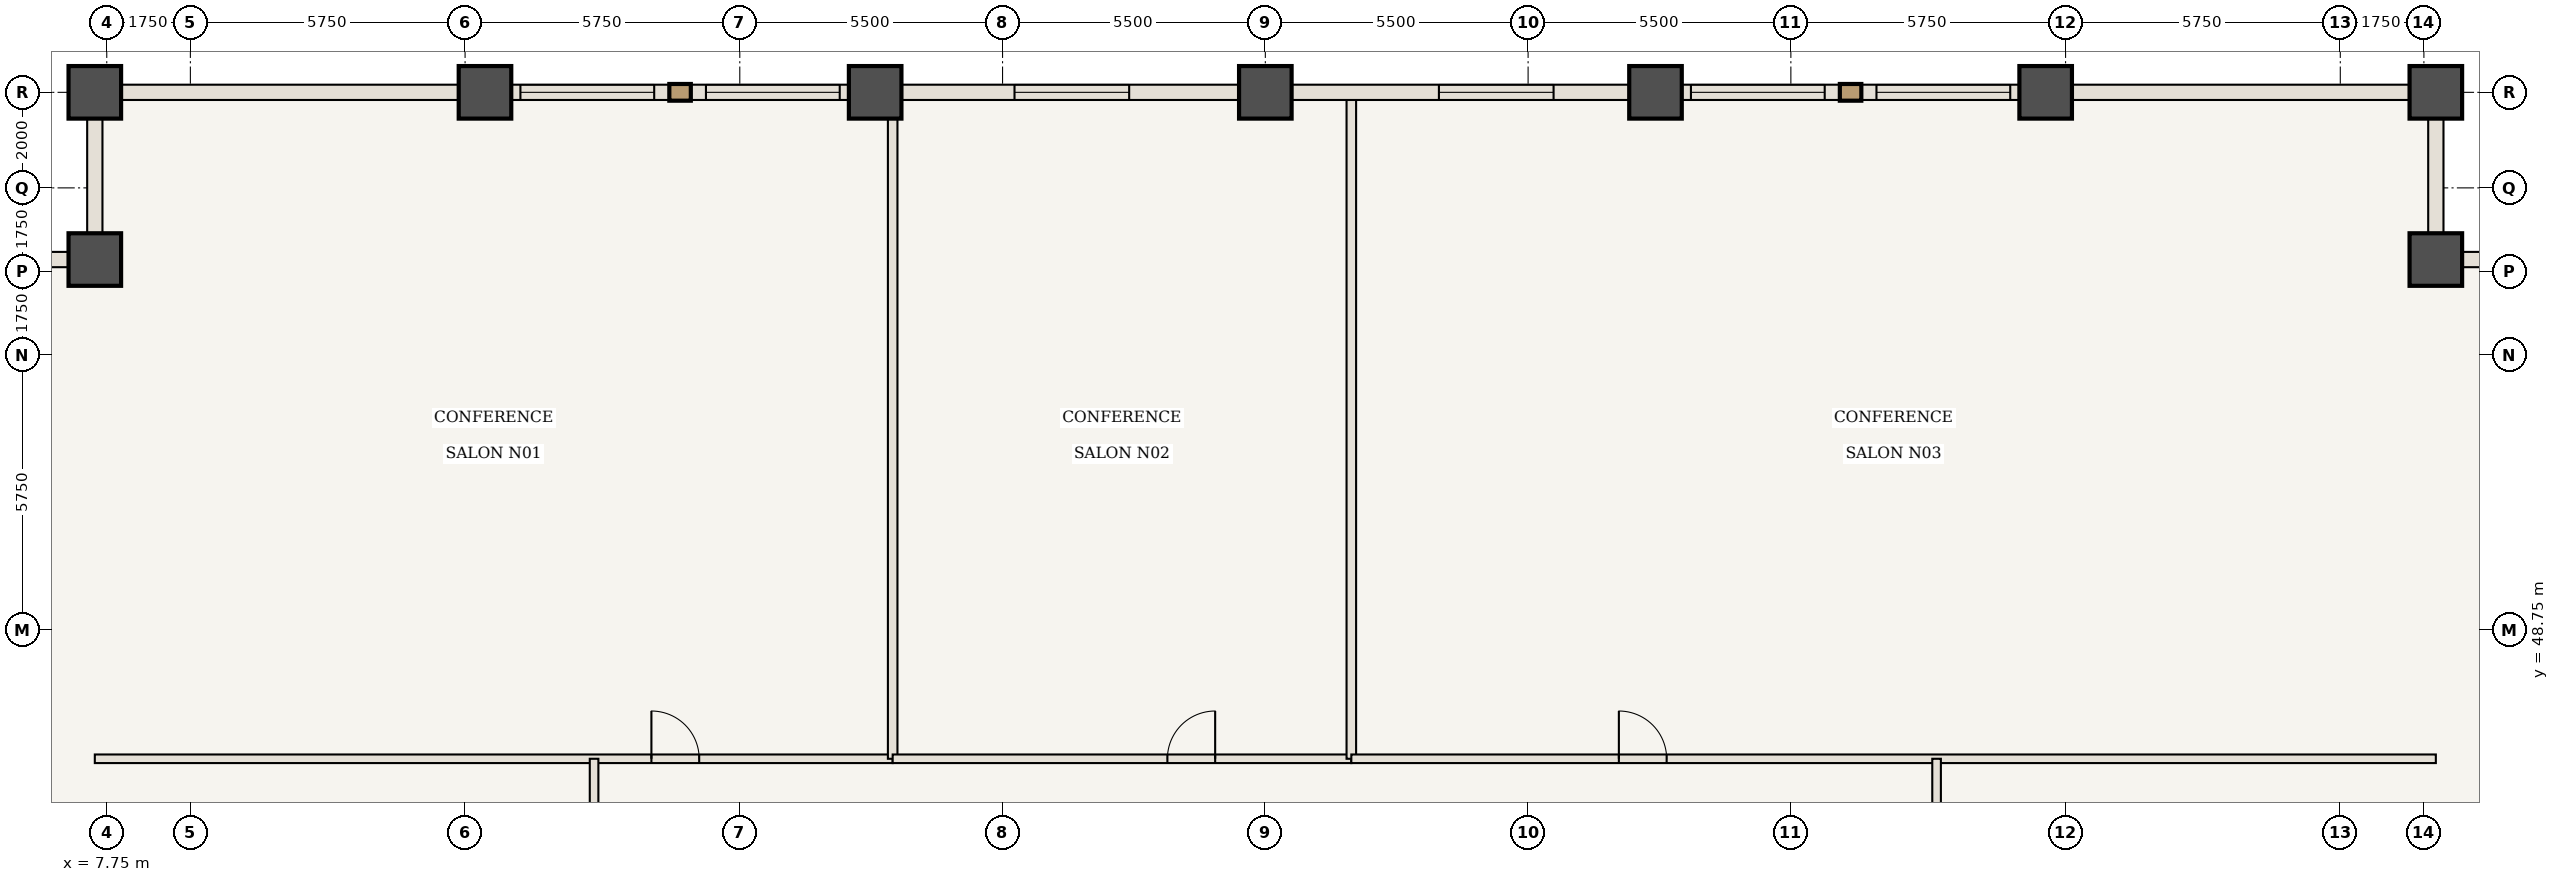
"""IFC4 building model, lengths in metres.
Left out: names, types, materials, properties, quantities, classifications, styles, units other than length and angle.
Written with IfcOpenShell. Run it as: python <this file> out.ifc"""

import sys

from ifc_helpers import new_model, si_unit, direction, frame, frame_2d, origin, origin_2d, place, context, subcontext, project, spatial, rectangle, extrude, element, fill, save


model = new_model("IFC4")
c1 = context("Model", 3, precision=1e-05, world=origin(), true_north=direction((0.0, 1.0)))
c2 = subcontext(c1, "Body", "Model", "MODEL_VIEW")
j1 = project(units=[si_unit("LENGTHUNIT", "METRE"), si_unit("PLANEANGLEUNIT", "RADIAN")], contexts=[c1])
p1 = place(None, origin())
s1 = spatial("IfcSite", under=j1, at=p1, CompositionType="ELEMENT")
p2 = place(p1, origin())
s2 = spatial("IfcBuilding", under=s1, at=p2, CompositionType="ELEMENT")
p3 = place(p2, frame((0.0, 0.0, 70.35)))
s3 = spatial("IfcBuildingStorey", under=s2, at=p3, CompositionType="ELEMENT", Elevation=70.35)
for number, where, z_axis, x_axis in (
    (1, (56.5, 56.5, 0.0), (0.0, 0.0, 1.0), (1.0, 0.0, 0.0)),
    (2, (56.5, 60.0, 0.0), (0.0, 0.0, 1.0), (1.0, 0.0, 0.0)),
    (3, (7.5, 60.0, 0.0), (0.0, 0.0, 1.0), (1.0, 0.0, 0.0)),
    (4, (7.5, 56.5, 0.0), (0.0, 0.0, 1.0), (1.0, 0.0, 0.0)),
    (5, (15.667, 60.0, 0.0), (0.0, 0.0, 1.0), (1.0, 0.0, 0.0)),
    (6, (23.833, 60.0, 0.0), (0.0, 0.0, 1.0), (1.0, 0.0, 0.0)),
    (7, (32.0, 60.0, 0.0), (0.0, 0.0, 1.0), (1.0, 0.0, 0.0)),
    (8, (40.167, 60.0, 0.0), (0.0, 0.0, 1.0), (1.0, 0.0, 0.0)),
    (9, (48.333, 60.0, 0.0), (0.0, 0.0, 1.0), (1.0, 0.0, 0.0)),
):
    element("IfcColumn", number, at=place(p3, frame(where, z_axis=z_axis, x_axis=x_axis)), inside=s3, PredefinedType="COLUMN", context=c2, shape_type="SweptSolid", body=[
        extrude(rectangle(XDim=1.1, YDim=1.1, at=origin_2d()), origin(), (0.0, 0.0, 1.0), 3.5),
    ])
p4 = place(p3, frame((7.5, 46.05, 0.0), z_axis=(0.0, 0.0, 1.0), x_axis=(1.0, 0.0, 0.0)))
e10 = element("IfcWall", 10, at=p4, inside=s3, PredefinedType="STANDARD", context=c2, shape_type="SweptSolid", body=[
    extrude(rectangle(XDim=16.7, YDim=0.18, at=frame_2d((8.35, 0.0))), origin(), (0.0, 0.0, 1.0), 3.32),
])
p5 = place(p4, frame((11.65, 0.0, 0.0)))
e11 = element("IfcOpeningElement", 11, at=p5, cuts=e10, PredefinedType="OPENING", context=c2, shape_type="SweptSolid", body=[
    extrude(rectangle(XDim=1.0, YDim=2.15, at=frame_2d((0.5, 1.075))), frame((0.0, 0.1, 0.0), z_axis=(0.0, -1.0, 0.0), x_axis=(1.0, 0.0, 0.0)), (0.0, 0.0, 1.0), 0.2),
])
p6 = place(p3, frame((24.2, 46.05, 0.0), z_axis=(0.0, 0.0, 1.0), x_axis=(0.0, 1.0, 0.0)))
e12 = element("IfcWall", 12, at=p6, inside=s3, PredefinedType="STANDARD", context=c2, shape_type="SweptSolid", body=[
    extrude(rectangle(XDim=13.89, YDim=0.2, at=frame_2d((6.945, 0.0))), origin(), (0.0, 0.0, 1.0), 3.32),
])
p7 = place(p3, frame((24.2, 46.05, 0.0), z_axis=(0.0, 0.0, 1.0), x_axis=(1.0, 0.0, 0.0)))
e13 = element("IfcWall", 13, at=p7, inside=s3, PredefinedType="STANDARD", context=c2, shape_type="SweptSolid", body=[
    extrude(rectangle(XDim=9.6, YDim=0.18, at=frame_2d((4.8, 0.0))), origin(), (0.0, 0.0, 1.0), 3.32),
])
p8 = place(p7, frame((5.75, 0.0, 0.0)))
e14 = element("IfcOpeningElement", 14, at=p8, cuts=e13, PredefinedType="OPENING", context=c2, shape_type="SweptSolid", body=[
    extrude(rectangle(XDim=1.0, YDim=2.15, at=frame_2d((0.5, 1.075))), frame((0.0, 0.1, 0.0), z_axis=(0.0, -1.0, 0.0), x_axis=(1.0, 0.0, 0.0)), (0.0, 0.0, 1.0), 0.2),
])
p9 = place(p3, frame((33.8, 46.05, 0.0), z_axis=(0.0, 0.0, 1.0), x_axis=(0.0, 1.0, 0.0)))
e15 = element("IfcWall", 15, at=p9, inside=s3, PredefinedType="STANDARD", context=c2, shape_type="SweptSolid", body=[
    extrude(rectangle(XDim=13.89, YDim=0.2, at=frame_2d((6.945, 0.0))), origin(), (0.0, 0.0, 1.0), 3.32),
])
p10 = place(p3, frame((33.8, 46.05, 0.0), z_axis=(0.0, 0.0, 1.0), x_axis=(1.0, 0.0, 0.0)))
e16 = element("IfcWall", 16, at=p10, inside=s3, PredefinedType="STANDARD", context=c2, shape_type="SweptSolid", body=[
    extrude(rectangle(XDim=22.7, YDim=0.18, at=frame_2d((11.35, 0.0))), origin(), (0.0, 0.0, 1.0), 3.32),
])
p11 = place(p10, frame((5.6, 0.0, 0.0)))
e17 = element("IfcOpeningElement", 17, at=p11, cuts=e16, PredefinedType="OPENING", context=c2, shape_type="SweptSolid", body=[
    extrude(rectangle(XDim=1.0, YDim=2.15, at=frame_2d((0.5, 1.075))), frame((0.0, 0.1, 0.0), z_axis=(0.0, -1.0, 0.0), x_axis=(1.0, 0.0, 0.0)), (0.0, 0.0, 1.0), 0.2),
])
p12 = place(p3, frame((17.95, 33.5, 0.0), z_axis=(0.0, 0.0, 1.0), x_axis=(0.0, 1.0, 0.0)))
e18 = element("IfcWall", 18, at=p12, inside=s3, PredefinedType="STANDARD", context=c2, shape_type="SweptSolid", body=[
    extrude(rectangle(XDim=12.55, YDim=0.18, at=frame_2d((6.275, 0.0))), origin(), (0.0, 0.0, 1.0), 3.32),
])
p13 = place(p12, frame((5.775, 0.0, 0.0)))
e19 = element("IfcOpeningElement", 19, at=p13, cuts=e18, PredefinedType="OPENING", context=c2, shape_type="SweptSolid", body=[
    extrude(rectangle(XDim=1.0, YDim=2.15, at=frame_2d((0.5, 1.075))), frame((0.0, 0.1, 0.0), z_axis=(0.0, -1.0, 0.0), x_axis=(1.0, 0.0, 0.0)), (0.0, 0.0, 1.0), 0.2),
])
p14 = place(p3, frame((46.05, 41.9, 0.0), z_axis=(0.0, 0.0, 1.0), x_axis=(0.0, 1.0, 0.0)))
e20 = element("IfcWall", 20, at=p14, inside=s3, PredefinedType="STANDARD", context=c2, shape_type="SweptSolid", body=[
    extrude(rectangle(XDim=4.15, YDim=0.18, at=frame_2d((2.075, 0.0))), origin(), (0.0, 0.0, 1.0), 3.32),
])
p15 = place(p14, frame((1.575, 0.0, 0.0)))
e21 = element("IfcOpeningElement", 21, at=p15, cuts=e20, PredefinedType="OPENING", context=c2, shape_type="SweptSolid", body=[
    extrude(rectangle(XDim=1.0, YDim=2.15, at=frame_2d((0.5, 1.075))), frame((0.0, 0.1, 0.0), z_axis=(0.0, -1.0, 0.0), x_axis=(1.0, 0.0, 0.0)), (0.0, 0.0, 1.0), 0.2),
])
p16 = place(p3, frame((7.5, 60.0, 0.0), z_axis=(0.0, 0.0, 1.0), x_axis=(1.0, 0.0, 0.0)))
e22 = element("IfcWall", 22, at=p16, inside=s3, PredefinedType="USERDEFINED", context=c2, shape_type="SweptSolid", body=[
    extrude(rectangle(XDim=8.167, YDim=0.32, at=frame_2d((4.083, 0.0))), origin(), (0.0, 0.0, 1.0), 2.52),
])
p17 = place(p3, frame((15.667, 60.0, 0.0), z_axis=(0.0, 0.0, 1.0), x_axis=(1.0, 0.0, 0.0)))
e23 = element("IfcWall", 23, at=p17, inside=s3, PredefinedType="USERDEFINED", context=c2, shape_type="SweptSolid", body=[
    extrude(rectangle(XDim=8.167, YDim=0.32, at=frame_2d((4.083, 0.0))), origin(), (0.0, 0.0, 1.0), 2.52),
])
p18 = place(p17, frame((0.742, 0.0, 0.85)))
e24 = element("IfcOpeningElement", 24, at=p18, cuts=e23, PredefinedType="OPENING", context=c2, shape_type="SweptSolid", body=[
    extrude(rectangle(XDim=2.8, YDim=1.47, at=frame_2d((1.4, 0.735))), frame((0.0, 0.17, 0.0), z_axis=(0.0, -1.0, 0.0), x_axis=(1.0, 0.0, 0.0)), (0.0, 0.0, 1.0), 0.34),
])
p19 = place(p17, frame((4.625, 0.0, 0.85)))
e25 = element("IfcOpeningElement", 25, at=p19, cuts=e23, PredefinedType="OPENING", context=c2, shape_type="SweptSolid", body=[
    extrude(rectangle(XDim=2.8, YDim=1.47, at=frame_2d((1.4, 0.735))), frame((0.0, 0.17, 0.0), z_axis=(0.0, -1.0, 0.0), x_axis=(1.0, 0.0, 0.0)), (0.0, 0.0, 1.0), 0.34),
])
p20 = place(p3, frame((23.833, 60.0, 0.0), z_axis=(0.0, 0.0, 1.0), x_axis=(1.0, 0.0, 0.0)))
e26 = element("IfcWall", 26, at=p20, inside=s3, PredefinedType="USERDEFINED", context=c2, shape_type="SweptSolid", body=[
    extrude(rectangle(XDim=8.167, YDim=0.32, at=frame_2d((4.083, 0.0))), origin(), (0.0, 0.0, 1.0), 2.52),
])
p21 = place(p20, frame((2.917, 0.0, 0.85)))
e27 = element("IfcOpeningElement", 27, at=p21, cuts=e26, PredefinedType="OPENING", context=c2, shape_type="SweptSolid", body=[
    extrude(rectangle(XDim=2.4, YDim=1.47, at=frame_2d((1.2, 0.735))), frame((0.0, 0.17, 0.0), z_axis=(0.0, -1.0, 0.0), x_axis=(1.0, 0.0, 0.0)), (0.0, 0.0, 1.0), 0.34),
])
p22 = place(p3, frame((32.0, 60.0, 0.0), z_axis=(0.0, 0.0, 1.0), x_axis=(1.0, 0.0, 0.0)))
e28 = element("IfcWall", 28, at=p22, inside=s3, PredefinedType="USERDEFINED", context=c2, shape_type="SweptSolid", body=[
    extrude(rectangle(XDim=8.167, YDim=0.32, at=frame_2d((4.083, 0.0))), origin(), (0.0, 0.0, 1.0), 2.52),
])
p23 = place(p22, frame((3.633, 0.0, 0.85)))
e29 = element("IfcOpeningElement", 29, at=p23, cuts=e28, PredefinedType="OPENING", context=c2, shape_type="SweptSolid", body=[
    extrude(rectangle(XDim=2.4, YDim=1.47, at=frame_2d((1.2, 0.735))), frame((0.0, 0.17, 0.0), z_axis=(0.0, -1.0, 0.0), x_axis=(1.0, 0.0, 0.0)), (0.0, 0.0, 1.0), 0.34),
])
p24 = place(p3, frame((40.167, 60.0, 0.0), z_axis=(0.0, 0.0, 1.0), x_axis=(1.0, 0.0, 0.0)))
e30 = element("IfcWall", 30, at=p24, inside=s3, PredefinedType="USERDEFINED", context=c2, shape_type="SweptSolid", body=[
    extrude(rectangle(XDim=8.167, YDim=0.32, at=frame_2d((4.083, 0.0))), origin(), (0.0, 0.0, 1.0), 2.52),
])
p25 = place(p24, frame((0.742, 0.0, 0.85)))
e31 = element("IfcOpeningElement", 31, at=p25, cuts=e30, PredefinedType="OPENING", context=c2, shape_type="SweptSolid", body=[
    extrude(rectangle(XDim=2.8, YDim=1.47, at=frame_2d((1.4, 0.735))), frame((0.0, 0.17, 0.0), z_axis=(0.0, -1.0, 0.0), x_axis=(1.0, 0.0, 0.0)), (0.0, 0.0, 1.0), 0.34),
])
p26 = place(p24, frame((4.625, 0.0, 0.85)))
e32 = element("IfcOpeningElement", 32, at=p26, cuts=e30, PredefinedType="OPENING", context=c2, shape_type="SweptSolid", body=[
    extrude(rectangle(XDim=2.8, YDim=1.47, at=frame_2d((1.4, 0.735))), frame((0.0, 0.17, 0.0), z_axis=(0.0, -1.0, 0.0), x_axis=(1.0, 0.0, 0.0)), (0.0, 0.0, 1.0), 0.34),
])
p27 = place(p3, frame((48.333, 60.0, 0.0), z_axis=(0.0, 0.0, 1.0), x_axis=(1.0, 0.0, 0.0)))
e33 = element("IfcWall", 33, at=p27, inside=s3, PredefinedType="USERDEFINED", context=c2, shape_type="SweptSolid", body=[
    extrude(rectangle(XDim=8.167, YDim=0.32, at=frame_2d((4.083, 0.0))), origin(), (0.0, 0.0, 1.0), 2.52),
])
for number, where, z_axis, x_axis in (
    (34, (56.5, 56.5, 0.0), (0.0, 0.0, 1.0), (1.0, 0.0, 0.0)),
    (35, (56.5, 60.0, 0.0), (0.0, 0.0, 1.0), (0.0, -1.0, 0.0)),
    (36, (7.5, 56.5, 0.0), (0.0, 0.0, 1.0), (0.0, 1.0, 0.0)),
    (37, (4.0, 56.5, 0.0), (0.0, 0.0, 1.0), (1.0, 0.0, 0.0)),
):
    element("IfcWall", number, at=place(p3, frame(where, z_axis=z_axis, x_axis=x_axis)), inside=s3, PredefinedType="USERDEFINED", context=c2, shape_type="SweptSolid", body=[
        extrude(rectangle(XDim=3.5, YDim=0.32, at=frame_2d((1.75, 0.0))), origin(), (0.0, 0.0, 1.0), 2.52),
    ])
p28 = place(p5, origin())
e38 = element("IfcDoor", 38, at=p28, inside=s3, OperationType="SINGLE_SWING_LEFT", PredefinedType="DOOR", context=c2, shape_type="SweptSolid", body=[
    extrude(rectangle(XDim=1.0, YDim=2.15, at=frame_2d((0.5, 1.075))), frame((0.0, 0.025, 0.0), z_axis=(0.0, -1.0, 0.0), x_axis=(1.0, 0.0, 0.0)), (0.0, 0.0, 1.0), 0.05),
])
fill(e11, e38)
p29 = place(p8, origin())
e39 = element("IfcDoor", 39, at=p29, inside=s3, OperationType="SINGLE_SWING_RIGHT", PredefinedType="DOOR", context=c2, shape_type="SweptSolid", body=[
    extrude(rectangle(XDim=1.0, YDim=2.15, at=frame_2d((0.5, 1.075))), frame((0.0, 0.025, 0.0), z_axis=(0.0, -1.0, 0.0), x_axis=(1.0, 0.0, 0.0)), (0.0, 0.0, 1.0), 0.05),
])
fill(e14, e39)
p30 = place(p11, origin())
e40 = element("IfcDoor", 40, at=p30, inside=s3, OperationType="SINGLE_SWING_LEFT", PredefinedType="DOOR", context=c2, shape_type="SweptSolid", body=[
    extrude(rectangle(XDim=1.0, YDim=2.15, at=frame_2d((0.5, 1.075))), frame((0.0, 0.025, 0.0), z_axis=(0.0, -1.0, 0.0), x_axis=(1.0, 0.0, 0.0)), (0.0, 0.0, 1.0), 0.05),
])
fill(e17, e40)
p31 = place(p18, origin())
e41 = element("IfcWindow", 41, at=p31, inside=s3, PartitioningType="SINGLE_PANEL", PredefinedType="WINDOW", context=c2, shape_type="SweptSolid", body=[
    extrude(rectangle(XDim=2.8, YDim=1.47, at=frame_2d((1.4, 0.735))), frame((0.0, 0.03, 0.0), z_axis=(0.0, -1.0, 0.0), x_axis=(1.0, 0.0, 0.0)), (0.0, 0.0, 1.0), 0.06),
])
fill(e24, e41)
p32 = place(p19, origin())
e42 = element("IfcWindow", 42, at=p32, inside=s3, PartitioningType="SINGLE_PANEL", PredefinedType="WINDOW", context=c2, shape_type="SweptSolid", body=[
    extrude(rectangle(XDim=2.8, YDim=1.47, at=frame_2d((1.4, 0.735))), frame((0.0, 0.03, 0.0), z_axis=(0.0, -1.0, 0.0), x_axis=(1.0, 0.0, 0.0)), (0.0, 0.0, 1.0), 0.06),
])
fill(e25, e42)
p33 = place(p21, origin())
e43 = element("IfcWindow", 43, at=p33, inside=s3, PartitioningType="SINGLE_PANEL", PredefinedType="WINDOW", context=c2, shape_type="SweptSolid", body=[
    extrude(rectangle(XDim=2.4, YDim=1.47, at=frame_2d((1.2, 0.735))), frame((0.0, 0.03, 0.0), z_axis=(0.0, -1.0, 0.0), x_axis=(1.0, 0.0, 0.0)), (0.0, 0.0, 1.0), 0.06),
])
fill(e27, e43)
p34 = place(p23, origin())
e44 = element("IfcWindow", 44, at=p34, inside=s3, PartitioningType="SINGLE_PANEL", PredefinedType="WINDOW", context=c2, shape_type="SweptSolid", body=[
    extrude(rectangle(XDim=2.4, YDim=1.47, at=frame_2d((1.2, 0.735))), frame((0.0, 0.03, 0.0), z_axis=(0.0, -1.0, 0.0), x_axis=(1.0, 0.0, 0.0)), (0.0, 0.0, 1.0), 0.06),
])
fill(e29, e44)
p35 = place(p25, origin())
e45 = element("IfcWindow", 45, at=p35, inside=s3, PartitioningType="SINGLE_PANEL", PredefinedType="WINDOW", context=c2, shape_type="SweptSolid", body=[
    extrude(rectangle(XDim=2.8, YDim=1.47, at=frame_2d((1.4, 0.735))), frame((0.0, 0.03, 0.0), z_axis=(0.0, -1.0, 0.0), x_axis=(1.0, 0.0, 0.0)), (0.0, 0.0, 1.0), 0.06),
])
fill(e31, e45)
p36 = place(p26, origin())
e46 = element("IfcWindow", 46, at=p36, inside=s3, PartitioningType="SINGLE_PANEL", PredefinedType="WINDOW", context=c2, shape_type="SweptSolid", body=[
    extrude(rectangle(XDim=2.8, YDim=1.47, at=frame_2d((1.4, 0.735))), frame((0.0, 0.03, 0.0), z_axis=(0.0, -1.0, 0.0), x_axis=(1.0, 0.0, 0.0)), (0.0, 0.0, 1.0), 0.06),
])
fill(e32, e46)
save(model, sys.argv[1])
